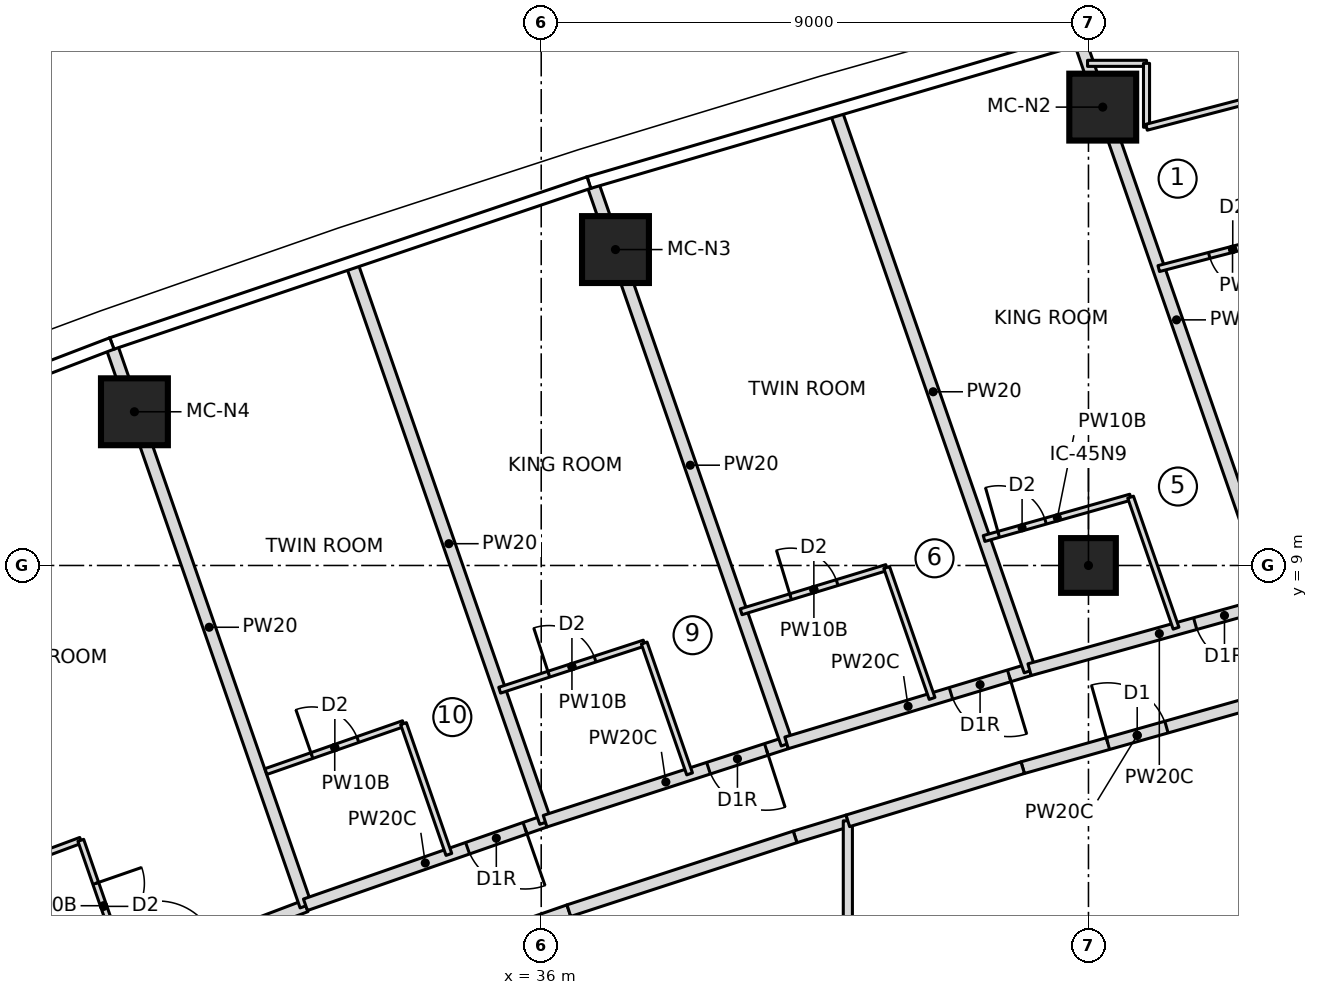
"""IFC4 building model, lengths in metres.
Left out: names, types, materials, properties, quantities, classifications, styles, units other than length and angle.
Written with IfcOpenShell. Run it as: python <this file> out.ifc"""

import sys

from ifc_helpers import new_model, si_unit, direction, frame, frame_2d, origin, origin_2d, place, context, subcontext, project, spatial, rectangle, extrude, element, fill, save


model = new_model("IFC4")
c1 = context("Model", 3, precision=1e-05, world=origin(), true_north=direction((0.0, 1.0)))
c2 = subcontext(c1, "Body", "Model", "MODEL_VIEW")
j1 = project(units=[si_unit("LENGTHUNIT", "METRE"), si_unit("PLANEANGLEUNIT", "RADIAN")], contexts=[c1])
p1 = place(None, origin())
s1 = spatial("IfcSite", under=j1, at=p1, CompositionType="ELEMENT")
p2 = place(p1, origin())
s2 = spatial("IfcBuilding", under=s1, at=p2, CompositionType="ELEMENT")
p3 = place(p2, frame((0.0, 0.0, 289.2)))
s3 = spatial("IfcBuildingStorey", under=s2, at=p3, CompositionType="ELEMENT", Elevation=289.2)
for number, where, z_axis, x_axis in (
    (1, (45.235, 16.539, 0.0), (0.0, 0.0, 1.0), (1.0, 0.0, 0.0)),
    (2, (37.221, 14.196, 0.0), (0.0, 0.0, 1.0), (1.0, 0.0, 0.0)),
    (3, (29.31, 11.528, 0.0), (0.0, 0.0, 1.0), (1.0, 0.0, 0.0)),
):
    element("IfcColumn", number, at=place(p3, frame(where, z_axis=z_axis, x_axis=x_axis)), inside=s3, PredefinedType="COLUMN", context=c2, shape_type="SweptSolid", body=[
        extrude(rectangle(XDim=1.1, YDim=1.1, at=origin_2d()), origin(), (0.0, 0.0, 1.0), 3.55),
    ])
p4 = place(p3, frame((45.0, 9.0, 0.0), z_axis=(0.0, 0.0, 1.0), x_axis=(1.0, 0.0, 0.0)))
e4 = element("IfcColumn", 4, at=p4, inside=s3, PredefinedType="COLUMN", context=c2, shape_type="SweptSolid", body=[
    extrude(rectangle(XDim=0.9, YDim=0.9, at=origin_2d()), origin(), (0.0, 0.0, 1.0), 3.55),
])
p5 = place(p3, frame((26.85, 1.401, 0.0), z_axis=(0.0, 0.0, 1.0), x_axis=(0.935181367748, 0.354169181912, 0.0)))
e5 = element("IfcWall", 5, at=p5, inside=s3, PredefinedType="PARTITIONING", context=c2, shape_type="SweptSolid", body=[
    extrude(rectangle(XDim=5.645, YDim=0.2, at=frame_2d((2.823, 0.0))), origin(), (0.0, 0.0, 1.0), 3.25),
])
p6 = place(p5, frame((3.05, 0.0, 0.0)))
e6 = element("IfcOpeningElement", 6, at=p6, cuts=e5, PredefinedType="OPENING", context=c2, shape_type="SweptSolid", body=[
    extrude(rectangle(XDim=1.0, YDim=2.1, at=frame_2d((0.5, 1.05))), frame((0.0, 0.11, 0.0), z_axis=(0.0, -1.0, 0.0), x_axis=(1.0, 0.0, 0.0)), (0.0, 0.0, 1.0), 0.22),
])
p7 = place(p3, frame((27.733, 4.222, 0.0), z_axis=(0.0, 0.0, 1.0), x_axis=(0.937514267289, 0.347946833049, 0.0)))
e7 = element("IfcWall", 7, at=p7, inside=s3, PredefinedType="PARTITIONING", context=c2, shape_type="SweptSolid", body=[
    extrude(rectangle(XDim=0.742, YDim=0.1, at=frame_2d((0.371, 0.0))), origin(), (0.0, 0.0, 1.0), 3.25),
])
p8 = place(p3, frame((28.428, 4.48, 0.0), z_axis=(0.0, 0.0, 1.0), x_axis=(0.327718024288, -0.944775579996, 0.0)))
e8 = element("IfcWall", 8, at=p8, inside=s3, PredefinedType="PARTITIONING", context=c2, shape_type="SweptSolid", body=[
    extrude(rectangle(XDim=2.277, YDim=0.1, at=frame_2d((1.139, 0.0))), origin(), (0.0, 0.0, 1.0), 3.25),
])
p9 = place(p8, frame((0.75, 0.0, 0.0)))
e9 = element("IfcOpeningElement", 9, at=p9, cuts=e8, PredefinedType="OPENING", context=c2, shape_type="SweptSolid", body=[
    extrude(rectangle(XDim=0.8, YDim=2.1, at=frame_2d((0.4, 1.05))), frame((0.0, 0.06, 0.0), z_axis=(0.0, -1.0, 0.0), x_axis=(1.0, 0.0, 0.0)), (0.0, 0.0, 1.0), 0.12),
])
p10 = place(p3, frame((32.129, 3.401, 0.0), z_axis=(0.0, 0.0, 1.0), x_axis=(-0.327724115377, 0.944773467134, 0.0)))
e10 = element("IfcWall", 10, at=p10, inside=s3, PredefinedType="PARTITIONING", context=c2, shape_type="SweptSolid", body=[
    extrude(rectangle(XDim=9.702, YDim=0.2, at=frame_2d((4.851, 0.0))), origin(), (0.0, 0.0, 1.0), 3.25),
])
p11 = place(p3, frame((36.064, 4.794, 0.0), z_axis=(0.0, 0.0, 1.0), x_axis=(-0.944236129554, -0.329269086986, 0.0)))
e11 = element("IfcWall", 11, at=p11, inside=s3, PredefinedType="PARTITIONING", context=c2, shape_type="SweptSolid", body=[
    extrude(rectangle(XDim=4.174, YDim=0.2, at=frame_2d((2.087, 0.0))), origin(), (0.0, 0.0, 1.0), 3.25),
])
p12 = place(p11, frame((0.35, 0.0, 0.0)))
e12 = element("IfcOpeningElement", 12, at=p12, cuts=e11, PredefinedType="OPENING", context=c2, shape_type="SweptSolid", body=[
    extrude(rectangle(XDim=1.0, YDim=2.1, at=frame_2d((0.5, 1.05))), frame((0.0, 0.11, 0.0), z_axis=(0.0, -1.0, 0.0), x_axis=(1.0, 0.0, 0.0)), (0.0, 0.0, 1.0), 0.22),
])
p13 = place(p3, frame((31.473, 5.611, 0.0), z_axis=(0.0, 0.0, 1.0), x_axis=(0.944305532659, 0.329069994059, 0.0)))
e13 = element("IfcWall", 13, at=p13, inside=s3, PredefinedType="PARTITIONING", context=c2, shape_type="SweptSolid", body=[
    extrude(rectangle(XDim=2.396, YDim=0.1, at=frame_2d((1.198, 0.0))), origin(), (0.0, 0.0, 1.0), 3.25),
])
p14 = place(p13, frame((0.8, 0.0, 0.0)))
e14 = element("IfcOpeningElement", 14, at=p14, cuts=e13, PredefinedType="OPENING", context=c2, shape_type="SweptSolid", body=[
    extrude(rectangle(XDim=0.8, YDim=2.1, at=frame_2d((0.4, 1.05))), frame((0.0, 0.06, 0.0), z_axis=(0.0, -1.0, 0.0), x_axis=(1.0, 0.0, 0.0)), (0.0, 0.0, 1.0), 0.12),
])
p15 = place(p3, frame((33.735, 6.399, 0.0), z_axis=(0.0, 0.0, 1.0), x_axis=(0.32768871219, -0.944785747089, 0.0)))
e15 = element("IfcWall", 15, at=p15, inside=s3, PredefinedType="PARTITIONING", context=c2, shape_type="SweptSolid", body=[
    extrude(rectangle(XDim=2.277, YDim=0.1, at=frame_2d((1.138, 0.0))), origin(), (0.0, 0.0, 1.0), 3.25),
])
p16 = place(p3, frame((36.071, 4.775, 0.0), z_axis=(0.0, 0.0, 1.0), x_axis=(-0.327725028322, 0.94477315045, 0.0)))
e16 = element("IfcWall", 16, at=p16, inside=s3, PredefinedType="PARTITIONING", context=c2, shape_type="SweptSolid", body=[
    extrude(rectangle(XDim=9.702, YDim=0.2, at=frame_2d((4.851, 0.0))), origin(), (0.0, 0.0, 1.0), 3.25),
])
p17 = place(p3, frame((40.035, 6.083, 0.0), z_axis=(0.0, 0.0, 1.0), x_axis=(-0.951196378796, -0.308586209941, 0.0)))
e17 = element("IfcWall", 17, at=p17, inside=s3, PredefinedType="PARTITIONING", context=c2, shape_type="SweptSolid", body=[
    extrude(rectangle(XDim=4.175, YDim=0.2, at=frame_2d((2.087, 0.0))), origin(), (0.0, 0.0, 1.0), 3.25),
])
p18 = place(p17, frame((0.35, 0.0, 0.0)))
e18 = element("IfcOpeningElement", 18, at=p18, cuts=e17, PredefinedType="OPENING", context=c2, shape_type="SweptSolid", body=[
    extrude(rectangle(XDim=1.0, YDim=2.1, at=frame_2d((0.5, 1.05))), frame((0.0, 0.11, 0.0), z_axis=(0.0, -1.0, 0.0), x_axis=(1.0, 0.0, 0.0)), (0.0, 0.0, 1.0), 0.22),
])
p19 = place(p3, frame((35.317, 6.948, 0.0), z_axis=(0.0, 0.0, 1.0), x_axis=(0.950666002187, 0.310216299194, 0.0)))
e19 = element("IfcWall", 19, at=p19, inside=s3, PredefinedType="PARTITIONING", context=c2, shape_type="SweptSolid", body=[
    extrude(rectangle(XDim=2.5, YDim=0.1, at=frame_2d((1.25, 0.0))), origin(), (0.0, 0.0, 1.0), 3.25),
])
p20 = place(p19, frame((0.85, 0.0, 0.0)))
e20 = element("IfcOpeningElement", 20, at=p20, cuts=e19, PredefinedType="OPENING", context=c2, shape_type="SweptSolid", body=[
    extrude(rectangle(XDim=0.8, YDim=2.1, at=frame_2d((0.4, 1.05))), frame((0.0, 0.06, 0.0), z_axis=(0.0, -1.0, 0.0), x_axis=(1.0, 0.0, 0.0)), (0.0, 0.0, 1.0), 0.12),
])
p21 = place(p3, frame((37.694, 7.724, 0.0), z_axis=(0.0, 0.0, 1.0), x_axis=(0.327622330203, -0.944808768351, 0.0)))
e21 = element("IfcWall", 21, at=p21, inside=s3, PredefinedType="PARTITIONING", context=c2, shape_type="SweptSolid", body=[
    extrude(rectangle(XDim=2.277, YDim=0.1, at=frame_2d((1.139, 0.0))), origin(), (0.0, 0.0, 1.0), 3.25),
])
p22 = place(p3, frame((40.042, 6.064, 0.0), z_axis=(0.0, 0.0, 1.0), x_axis=(-0.327710853631, 0.944778067279, 0.0)))
e22 = element("IfcWall", 22, at=p22, inside=s3, PredefinedType="PARTITIONING", context=c2, shape_type="SweptSolid", body=[
    extrude(rectangle(XDim=9.707, YDim=0.2, at=frame_2d((4.854, 0.0))), origin(), (0.0, 0.0, 1.0), 3.25),
])
p23 = place(p3, frame((44.031, 7.286, 0.0), z_axis=(0.0, 0.0, 1.0), x_axis=(-0.957521424208, -0.288362137222, 0.0)))
e23 = element("IfcWall", 23, at=p23, inside=s3, PredefinedType="PARTITIONING", context=c2, shape_type="SweptSolid", body=[
    extrude(rectangle(XDim=4.173, YDim=0.2, at=frame_2d((2.086, 0.0))), origin(), (0.0, 0.0, 1.0), 3.25),
])
p24 = place(p23, frame((0.35, 0.0, 0.0)))
e24 = element("IfcOpeningElement", 24, at=p24, cuts=e23, PredefinedType="OPENING", context=c2, shape_type="SweptSolid", body=[
    extrude(rectangle(XDim=1.0, YDim=2.1, at=frame_2d((0.5, 1.05))), frame((0.0, 0.11, 0.0), z_axis=(0.0, -1.0, 0.0), x_axis=(1.0, 0.0, 0.0)), (0.0, 0.0, 1.0), 0.22),
])
p25 = place(p3, frame((39.288, 8.238, 0.0), z_axis=(0.0, 0.0, 1.0), x_axis=(0.956723503196, 0.290998519638, 0.0)))
e25 = element("IfcWall", 25, at=p25, inside=s3, PredefinedType="PARTITIONING", context=c2, shape_type="SweptSolid", body=[
    extrude(rectangle(XDim=2.502, YDim=0.1, at=frame_2d((1.251, 0.0))), origin(), (0.0, 0.0, 1.0), 3.25),
])
p26 = place(p25, frame((0.85, 0.0, 0.0)))
e26 = element("IfcOpeningElement", 26, at=p26, cuts=e25, PredefinedType="OPENING", context=c2, shape_type="SweptSolid", body=[
    extrude(rectangle(XDim=0.8, YDim=2.1, at=frame_2d((0.4, 1.05))), frame((0.0, 0.06, 0.0), z_axis=(0.0, -1.0, 0.0), x_axis=(1.0, 0.0, 0.0)), (0.0, 0.0, 1.0), 0.12),
])
p27 = place(p3, frame((41.681, 8.966, 0.0), z_axis=(0.0, 0.0, 1.0), x_axis=(0.327743427431, -0.944766767925, 0.0)))
e27 = element("IfcWall", 27, at=p27, inside=s3, PredefinedType="PARTITIONING", context=c2, shape_type="SweptSolid", body=[
    extrude(rectangle(XDim=2.279, YDim=0.1, at=frame_2d((1.139, 0.0))), origin(), (0.0, 0.0, 1.0), 3.25),
])
p28 = place(p3, frame((44.038, 7.267, 0.0), z_axis=(0.0, 0.0, 1.0), x_axis=(-0.327714576096, 0.944776776077, 0.0)))
e28 = element("IfcWall", 28, at=p28, inside=s3, PredefinedType="PARTITIONING", context=c2, shape_type="SweptSolid", body=[
    extrude(rectangle(XDim=9.717, YDim=0.2, at=frame_2d((4.858, 0.0))), origin(), (0.0, 0.0, 1.0), 3.25),
])
p29 = place(p3, frame((48.299, 8.473, 0.0), z_axis=(0.0, 0.0, 1.0), x_axis=(-0.96343417102, -0.267945140115, 0.0)))
e29 = element("IfcWall", 29, at=p29, inside=s3, PredefinedType="PARTITIONING", context=c2, shape_type="SweptSolid", body=[
    extrude(rectangle(XDim=4.43, YDim=0.2, at=frame_2d((2.215, 0.0))), origin(), (0.0, 0.0, 1.0), 3.25),
])
p30 = place(p29, frame((0.603, 0.0, 0.0)))
e30 = element("IfcOpeningElement", 30, at=p30, cuts=e29, PredefinedType="OPENING", context=c2, shape_type="SweptSolid", body=[
    extrude(rectangle(XDim=1.0, YDim=2.1, at=frame_2d((0.5, 1.05))), frame((0.0, 0.11, 0.0), z_axis=(0.0, -1.0, 0.0), x_axis=(1.0, 0.0, 0.0)), (0.0, 0.0, 1.0), 0.22),
])
p31 = place(p3, frame((43.283, 9.444, 0.0), z_axis=(0.0, 0.0, 1.0), x_axis=(0.962409173596, 0.271603723424, 0.0)))
e31 = element("IfcWall", 31, at=p31, inside=s3, PredefinedType="PARTITIONING", context=c2, shape_type="SweptSolid", body=[
    extrude(rectangle(XDim=2.504, YDim=0.1, at=frame_2d((1.252, 0.0))), origin(), (0.0, 0.0, 1.0), 3.25),
])
p32 = place(p31, frame((0.25, 0.0, 0.0)))
e32 = element("IfcOpeningElement", 32, at=p32, cuts=e31, PredefinedType="OPENING", context=c2, shape_type="SweptSolid", body=[
    extrude(rectangle(XDim=0.8, YDim=2.1, at=frame_2d((0.4, 1.05))), frame((0.0, 0.06, 0.0), z_axis=(0.0, -1.0, 0.0), x_axis=(1.0, 0.0, 0.0)), (0.0, 0.0, 1.0), 0.12),
])
p33 = place(p3, frame((45.693, 10.124, 0.0), z_axis=(0.0, 0.0, 1.0), x_axis=(0.327764902685, -0.944759317799, 0.0)))
e33 = element("IfcWall", 33, at=p33, inside=s3, PredefinedType="PARTITIONING", context=c2, shape_type="SweptSolid", body=[
    extrude(rectangle(XDim=2.281, YDim=0.1, at=frame_2d((1.14, 0.0))), origin(), (0.0, 0.0, 1.0), 3.25),
])
p34 = place(p3, frame((48.023, 8.5, 0.0), z_axis=(0.0, 0.0, 1.0), x_axis=(-0.327705598625, 0.944779890043, 0.0)))
e34 = element("IfcWall", 34, at=p34, inside=s3, PredefinedType="PARTITIONING", context=c2, shape_type="SweptSolid", body=[
    extrude(rectangle(XDim=9.61, YDim=0.2, at=frame_2d((4.805, 0.0))), origin(), (0.0, 0.0, 1.0), 3.25),
])
p35 = place(p3, frame((48.583, 14.516, 0.0), z_axis=(0.0, 0.0, 1.0), x_axis=(-0.967665843663, -0.252235633897, 0.0)))
e35 = element("IfcWall", 35, at=p35, inside=s3, PredefinedType="PARTITIONING", context=c2, shape_type="SweptSolid", body=[
    extrude(rectangle(XDim=2.508, YDim=0.1, at=frame_2d((1.254, 0.0))), origin(), (0.0, 0.0, 1.0), 3.25),
])
p36 = place(p35, frame((0.85, 0.0, 0.0)))
e36 = element("IfcOpeningElement", 36, at=p36, cuts=e35, PredefinedType="OPENING", context=c2, shape_type="SweptSolid", body=[
    extrude(rectangle(XDim=0.8, YDim=2.1, at=frame_2d((0.4, 1.05))), frame((0.0, 0.06, 0.0), z_axis=(0.0, -1.0, 0.0), x_axis=(1.0, 0.0, 0.0)), (0.0, 0.0, 1.0), 0.12),
])
p37 = place(p3, frame((44.985, 17.259, 0.0), z_axis=(0.0, 0.0, 1.0), x_axis=(1.0, 0.0, 0.0)))
e37 = element("IfcWall", 37, at=p37, inside=s3, PredefinedType="PARTITIONING", context=c2, shape_type="SweptSolid", body=[
    extrude(rectangle(XDim=0.97, YDim=0.1, at=frame_2d((0.485, 0.0))), origin(), (0.0, 0.0, 1.0), 3.25),
])
p38 = place(p3, frame((45.955, 17.259, 0.0), z_axis=(0.0, 0.0, 1.0), x_axis=(0.0, -1.0, 0.0)))
e38 = element("IfcWall", 38, at=p38, inside=s3, PredefinedType="PARTITIONING", context=c2, shape_type="SweptSolid", body=[
    extrude(rectangle(XDim=1.051, YDim=0.1, at=frame_2d((0.525, 0.0))), origin(), (0.0, 0.0, 1.0), 3.25),
])
p39 = place(p3, frame((45.955, 16.208, 0.0), z_axis=(0.0, 0.0, 1.0), x_axis=(0.967650770907, 0.25229345129, 0.0)))
e39 = element("IfcWall", 39, at=p39, inside=s3, PredefinedType="PARTITIONING", context=c2, shape_type="SweptSolid", body=[
    extrude(rectangle(XDim=1.934, YDim=0.1, at=frame_2d((0.967, 0.0))), origin(), (0.0, 0.0, 1.0), 3.25),
])
p40 = place(p3, frame((40.175, 4.536, 0.0), z_axis=(0.0, 0.0, 1.0), x_axis=(0.956745556466, 0.290926004652, 0.0)))
e40 = element("IfcWall", 40, at=p40, inside=s3, PredefinedType="PARTITIONING", context=c2, shape_type="SweptSolid", body=[
    extrude(rectangle(XDim=0.907, YDim=0.2, at=frame_2d((0.454, 0.0))), origin(), (0.0, 0.0, 1.0), 3.25),
])
p41 = place(p3, frame((33.385, 2.253, 0.0), z_axis=(0.0, 0.0, 1.0), x_axis=(0.944275670423, 0.329155674791, 0.0)))
e41 = element("IfcWall", 41, at=p41, inside=s3, PredefinedType="PARTITIONING", context=c2, shape_type="SweptSolid", body=[
    extrude(rectangle(XDim=3.25, YDim=0.2, at=frame_2d((1.625, 0.0))), origin(), (0.0, 0.0, 1.0), 3.25),
])
p42 = place(p3, frame((36.455, 3.323, 0.0), z_axis=(0.0, 0.0, 1.0), x_axis=(0.950709849021, 0.310081897206, 0.0)))
e42 = element("IfcWall", 42, at=p42, inside=s3, PredefinedType="PARTITIONING", context=c2, shape_type="SweptSolid", body=[
    extrude(rectangle(XDim=3.913, YDim=0.2, at=frame_2d((1.957, 0.0))), origin(), (0.0, 0.0, 1.0), 3.25),
])
p43 = place(p3, frame((41.043, -4.8, 0.0), z_axis=(0.0, 0.0, 1.0), x_axis=(0.0, 1.0, 0.0)))
e43 = element("IfcWall", 43, at=p43, inside=s3, PredefinedType="PARTITIONING", context=c2, shape_type="SweptSolid", body=[
    extrude(rectangle(XDim=9.6, YDim=0.15, at=frame_2d((4.8, 0.0))), origin(), (0.0, 0.0, 1.0), 3.25),
])
p44 = place(p3, frame((43.918, 5.675, 0.0), z_axis=(0.0, 0.0, 1.0), x_axis=(0.962411212211, 0.271596499628, 0.0)))
e44 = element("IfcWall", 44, at=p44, inside=s3, PredefinedType="PARTITIONING", context=c2, shape_type="SweptSolid", body=[
    extrude(rectangle(XDim=3.913, YDim=0.2, at=frame_2d((1.957, 0.0))), origin(), (0.0, 0.0, 1.0), 3.25),
])
p45 = place(p44, frame((1.457, 0.0, 0.0)))
e45 = element("IfcOpeningElement", 45, at=p45, cuts=e44, PredefinedType="OPENING", context=c2, shape_type="SweptSolid", body=[
    extrude(rectangle(XDim=1.0, YDim=2.1, at=frame_2d((0.5, 1.05))), frame((0.0, 0.11, 0.0), z_axis=(0.0, -1.0, 0.0), x_axis=(1.0, 0.0, 0.0)), (0.0, 0.0, 1.0), 0.22),
])
p46 = place(p3, frame((41.043, 4.8, 0.0), z_axis=(0.0, 0.0, 1.0), x_axis=(0.956717150932, 0.291019403327, 0.0)))
e46 = element("IfcWall", 46, at=p46, inside=s3, PredefinedType="PARTITIONING", context=c2, shape_type="SweptSolid", body=[
    extrude(rectangle(XDim=3.006, YDim=0.2, at=frame_2d((1.503, 0.0))), origin(), (0.0, 0.0, 1.0), 3.25),
])
p47 = place(p9, origin())
e47 = element("IfcDoor", 47, at=p47, inside=s3, OperationType="SINGLE_SWING_LEFT", PredefinedType="DOOR", context=c2, shape_type="SweptSolid", body=[
    extrude(rectangle(XDim=0.8, YDim=2.1, at=frame_2d((0.4, 1.05))), frame((0.0, 0.025, 0.0), z_axis=(0.0, -1.0, 0.0), x_axis=(1.0, 0.0, 0.0)), (0.0, 0.0, 1.0), 0.05),
])
fill(e9, e47)
p48 = place(p14, origin())
e48 = element("IfcDoor", 48, at=p48, inside=s3, OperationType="SINGLE_SWING_LEFT", PredefinedType="DOOR", context=c2, shape_type="SweptSolid", body=[
    extrude(rectangle(XDim=0.8, YDim=2.1, at=frame_2d((0.4, 1.05))), frame((0.0, 0.025, 0.0), z_axis=(0.0, -1.0, 0.0), x_axis=(1.0, 0.0, 0.0)), (0.0, 0.0, 1.0), 0.05),
])
fill(e14, e48)
p49 = place(p12, origin())
e49 = element("IfcDoor", 49, at=p49, inside=s3, OperationType="SINGLE_SWING_RIGHT", PredefinedType="DOOR", context=c2, shape_type="SweptSolid", body=[
    extrude(rectangle(XDim=1.0, YDim=2.1, at=frame_2d((0.5, 1.05))), frame((0.0, 0.025, 0.0), z_axis=(0.0, -1.0, 0.0), x_axis=(1.0, 0.0, 0.0)), (0.0, 0.0, 1.0), 0.05),
])
fill(e12, e49)
p50 = place(p20, origin())
e50 = element("IfcDoor", 50, at=p50, inside=s3, OperationType="SINGLE_SWING_LEFT", PredefinedType="DOOR", context=c2, shape_type="SweptSolid", body=[
    extrude(rectangle(XDim=0.8, YDim=2.1, at=frame_2d((0.4, 1.05))), frame((0.0, 0.025, 0.0), z_axis=(0.0, -1.0, 0.0), x_axis=(1.0, 0.0, 0.0)), (0.0, 0.0, 1.0), 0.05),
])
fill(e20, e50)
p51 = place(p18, origin())
e51 = element("IfcDoor", 51, at=p51, inside=s3, OperationType="SINGLE_SWING_RIGHT", PredefinedType="DOOR", context=c2, shape_type="SweptSolid", body=[
    extrude(rectangle(XDim=1.0, YDim=2.1, at=frame_2d((0.5, 1.05))), frame((0.0, 0.025, 0.0), z_axis=(0.0, -1.0, 0.0), x_axis=(1.0, 0.0, 0.0)), (0.0, 0.0, 1.0), 0.05),
])
fill(e18, e51)
p52 = place(p26, origin())
e52 = element("IfcDoor", 52, at=p52, inside=s3, OperationType="SINGLE_SWING_LEFT", PredefinedType="DOOR", context=c2, shape_type="SweptSolid", body=[
    extrude(rectangle(XDim=0.8, YDim=2.1, at=frame_2d((0.4, 1.05))), frame((0.0, 0.025, 0.0), z_axis=(0.0, -1.0, 0.0), x_axis=(1.0, 0.0, 0.0)), (0.0, 0.0, 1.0), 0.05),
])
fill(e26, e52)
p53 = place(p24, origin())
e53 = element("IfcDoor", 53, at=p53, inside=s3, OperationType="SINGLE_SWING_RIGHT", PredefinedType="DOOR", context=c2, shape_type="SweptSolid", body=[
    extrude(rectangle(XDim=1.0, YDim=2.1, at=frame_2d((0.5, 1.05))), frame((0.0, 0.025, 0.0), z_axis=(0.0, -1.0, 0.0), x_axis=(1.0, 0.0, 0.0)), (0.0, 0.0, 1.0), 0.05),
])
fill(e24, e53)
p54 = place(p32, origin())
e54 = element("IfcDoor", 54, at=p54, inside=s3, OperationType="SINGLE_SWING_LEFT", PredefinedType="DOOR", context=c2, shape_type="SweptSolid", body=[
    extrude(rectangle(XDim=0.8, YDim=2.1, at=frame_2d((0.4, 1.05))), frame((0.0, 0.025, 0.0), z_axis=(0.0, -1.0, 0.0), x_axis=(1.0, 0.0, 0.0)), (0.0, 0.0, 1.0), 0.05),
])
fill(e32, e54)
p55 = place(p30, origin())
e55 = element("IfcDoor", 55, at=p55, inside=s3, OperationType="SINGLE_SWING_RIGHT", PredefinedType="DOOR", context=c2, shape_type="SweptSolid", body=[
    extrude(rectangle(XDim=1.0, YDim=2.1, at=frame_2d((0.5, 1.05))), frame((0.0, 0.025, 0.0), z_axis=(0.0, -1.0, 0.0), x_axis=(1.0, 0.0, 0.0)), (0.0, 0.0, 1.0), 0.05),
])
fill(e30, e55)
p56 = place(p36, origin())
e56 = element("IfcDoor", 56, at=p56, inside=s3, OperationType="SINGLE_SWING_LEFT", PredefinedType="DOOR", context=c2, shape_type="SweptSolid", body=[
    extrude(rectangle(XDim=0.8, YDim=2.1, at=frame_2d((0.4, 1.05))), frame((0.0, 0.025, 0.0), z_axis=(0.0, -1.0, 0.0), x_axis=(1.0, 0.0, 0.0)), (0.0, 0.0, 1.0), 0.05),
])
fill(e36, e56)
p57 = place(p45, origin())
e57 = element("IfcDoor", 57, at=p57, inside=s3, OperationType="SINGLE_SWING_LEFT", PredefinedType="DOOR", context=c2, shape_type="SweptSolid", body=[
    extrude(rectangle(XDim=1.0, YDim=2.1, at=frame_2d((0.5, 1.05))), frame((0.0, 0.025, 0.0), z_axis=(0.0, -1.0, 0.0), x_axis=(1.0, 0.0, 0.0)), (0.0, 0.0, 1.0), 0.05),
])
fill(e45, e57)
save(model, sys.argv[1])
